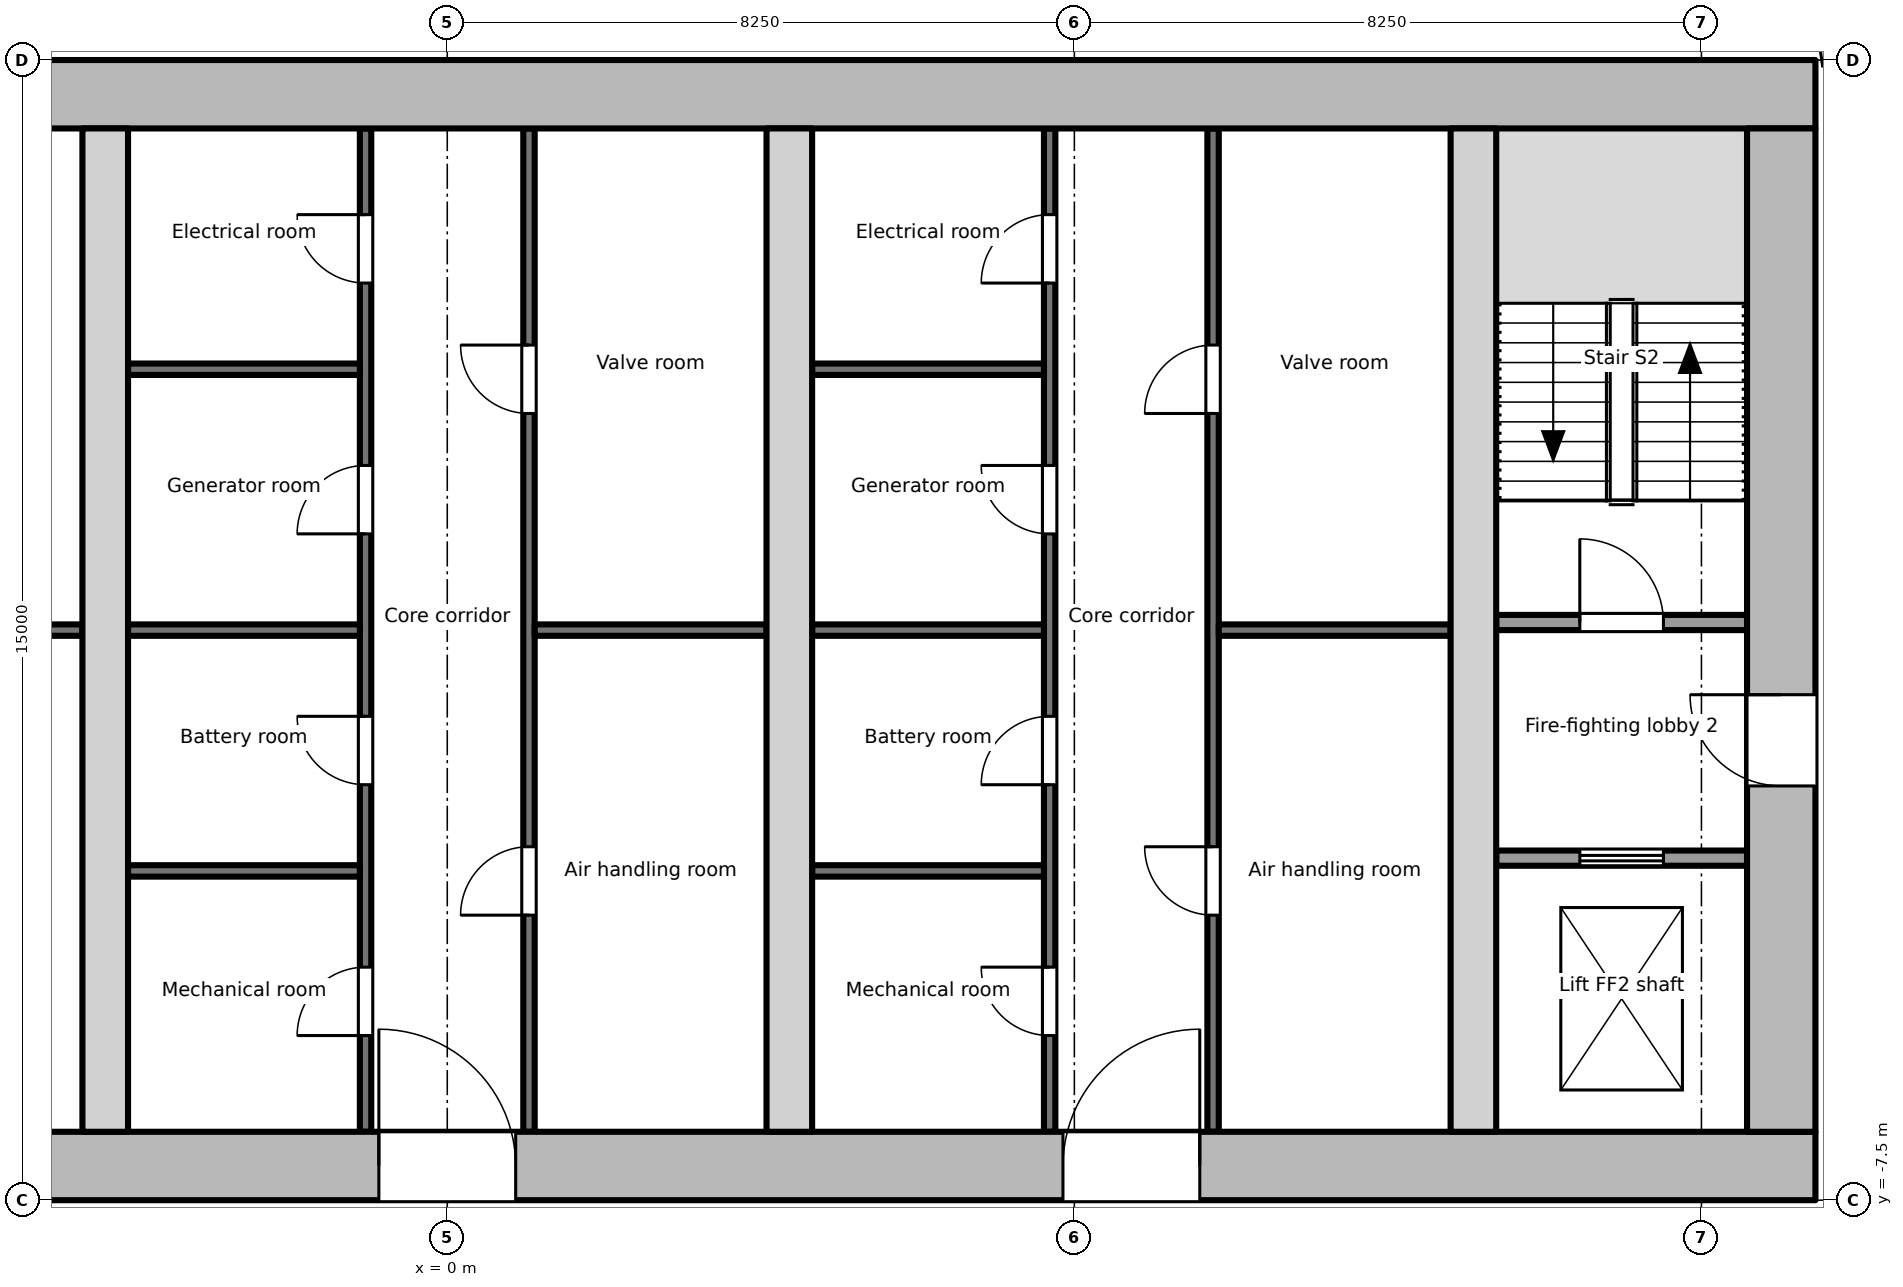
"""IFC4 building model, lengths in metres.
Left out: names, types, materials, properties, quantities, classifications, styles, units other than length and angle.
Written with IfcOpenShell. Run it as: python <this file> out.ifc"""

import sys

from ifc_helpers import new_model, si_unit, direction, frame, frame_2d, origin, place, context, subcontext, project, spatial, rectangle, extrude, element, fill, save


model = new_model("IFC4")
c1 = context("Model", 3, precision=1e-05, world=origin(), true_north=direction((0.0, 1.0)))
c2 = subcontext(c1, "Body", "Model", "MODEL_VIEW")
j1 = project(units=[si_unit("LENGTHUNIT", "METRE"), si_unit("PLANEANGLEUNIT", "RADIAN")], contexts=[c1])
p1 = place(None, origin())
s1 = spatial("IfcSite", under=j1, at=p1, CompositionType="ELEMENT")
p2 = place(p1, origin())
s2 = spatial("IfcBuilding", under=s1, at=p2, CompositionType="ELEMENT")
p3 = place(p2, frame((0.0, 0.0, 308.3)))
s3 = spatial("IfcBuildingStorey", under=s2, at=p3, CompositionType="ELEMENT", Elevation=308.3)
p4 = place(p3, frame((-18.0, -7.05, -0.2), z_axis=(0.0, 0.0, 1.0), x_axis=(1.0, 0.0, 0.0)))
e1 = element("IfcWall", 1, at=p4, inside=s3, PredefinedType="SHEAR", context=c2, shape_type="SweptSolid", body=[
    extrude(rectangle(XDim=36.0, YDim=0.9, at=frame_2d((18.0, 0.0))), origin(), (0.0, 0.0, 1.0), 4.0),
])
p5 = place(p4, frame((8.1, 0.0, 0.2)))
e2 = element("IfcOpeningElement", 2, at=p5, cuts=e1, PredefinedType="OPENING", context=c2, shape_type="SweptSolid", body=[
    extrude(rectangle(XDim=1.8, YDim=2.1, at=frame_2d((0.9, 1.05))), frame((0.0, 0.46, 0.0), z_axis=(0.0, -1.0, 0.0), x_axis=(1.0, 0.0, 0.0)), (0.0, 0.0, 1.0), 0.921),
])
p6 = place(p4, frame((17.1, 0.0, 0.2)))
e3 = element("IfcOpeningElement", 3, at=p6, cuts=e1, PredefinedType="OPENING", context=c2, shape_type="SweptSolid", body=[
    extrude(rectangle(XDim=1.8, YDim=2.1, at=frame_2d((0.9, 1.05))), frame((0.0, 0.46, 0.0), z_axis=(0.0, -1.0, 0.0), x_axis=(1.0, 0.0, 0.0)), (0.0, 0.0, 1.0), 0.921),
])
p7 = place(p4, frame((26.1, 0.0, 0.2)))
e4 = element("IfcOpeningElement", 4, at=p7, cuts=e1, PredefinedType="OPENING", context=c2, shape_type="SweptSolid", body=[
    extrude(rectangle(XDim=1.8, YDim=2.1, at=frame_2d((0.9, 1.05))), frame((0.0, 0.46, 0.0), z_axis=(0.0, -1.0, 0.0), x_axis=(1.0, 0.0, 0.0)), (0.0, 0.0, 1.0), 0.921),
])
p8 = place(p3, frame((-18.0, 7.05, -0.2), z_axis=(0.0, 0.0, 1.0), x_axis=(1.0, 0.0, 0.0)))
e5 = element("IfcWall", 5, at=p8, inside=s3, PredefinedType="SHEAR", context=c2, shape_type="SweptSolid", body=[
    extrude(rectangle(XDim=36.0, YDim=0.9, at=frame_2d((18.0, 0.0))), origin(), (0.0, 0.0, 1.0), 4.0),
])
p9 = place(p3, frame((17.55, -6.6, -0.2), z_axis=(0.0, 0.0, 1.0), x_axis=(0.0, 1.0, 0.0)))
e6 = element("IfcWall", 6, at=p9, inside=s3, PredefinedType="SHEAR", context=c2, shape_type="SweptSolid", body=[
    extrude(rectangle(XDim=13.2, YDim=0.9, at=frame_2d((6.6, 0.0))), origin(), (0.0, 0.0, 1.0), 4.0),
])
p10 = place(p9, frame((4.55, 0.0, 0.2)))
e7 = element("IfcOpeningElement", 7, at=p10, cuts=e6, PredefinedType="OPENING", context=c2, shape_type="SweptSolid", body=[
    extrude(rectangle(XDim=1.2, YDim=2.1, at=frame_2d((0.6, 1.05))), frame((0.0, 0.46, 0.0), z_axis=(0.0, -1.0, 0.0), x_axis=(1.0, 0.0, 0.0)), (0.0, 0.0, 1.0), 0.921),
])
for number, where, z_axis, x_axis in (
    (8, (-4.5, -6.6, -0.2), (0.0, 0.0, 1.0), (0.0, 1.0, 0.0)),
    (9, (4.5, -6.6, -0.2), (0.0, 0.0, 1.0), (0.0, 1.0, 0.0)),
    (10, (13.5, -6.6, -0.2), (0.0, 0.0, 1.0), (0.0, 1.0, 0.0)),
):
    element("IfcWall", number, at=place(p3, frame(where, z_axis=z_axis, x_axis=x_axis)), inside=s3, PredefinedType="SHEAR", context=c2, shape_type="SweptSolid", body=[
        extrude(rectangle(XDim=13.2, YDim=0.6, at=frame_2d((6.6, 0.0))), origin(), (0.0, 0.0, 1.0), 4.0),
    ])
p11 = place(p3, frame((13.8, -3.0, 0.0), z_axis=(0.0, 0.0, 1.0), x_axis=(1.0, 0.0, 0.0)))
e11 = element("IfcWall", 11, at=p11, inside=s3, PredefinedType="PARTITIONING", context=c2, shape_type="SweptSolid", body=[
    extrude(rectangle(XDim=3.3, YDim=0.2, at=frame_2d((1.65, 0.0))), origin(), (0.0, 0.0, 1.0), 3.8),
])
p12 = place(p11, frame((1.1, 0.0, 0.0)))
e12 = element("IfcOpeningElement", 12, at=p12, cuts=e11, PredefinedType="OPENING", context=c2, shape_type="SweptSolid", body=[
    extrude(rectangle(XDim=1.1, YDim=2.1, at=frame_2d((0.55, 1.05))), frame((0.0, 0.111, 0.0), z_axis=(0.0, -1.0, 0.0), x_axis=(1.0, 0.0, 0.0)), (0.0, 0.0, 1.0), 0.221),
])
p13 = place(p3, frame((13.8, 0.1, 0.0), z_axis=(0.0, 0.0, 1.0), x_axis=(1.0, 0.0, 0.0)))
e13 = element("IfcWall", 13, at=p13, inside=s3, PredefinedType="PARTITIONING", context=c2, shape_type="SweptSolid", body=[
    extrude(rectangle(XDim=3.3, YDim=0.2, at=frame_2d((1.65, 0.0))), origin(), (0.0, 0.0, 1.0), 3.8),
])
p14 = place(p13, frame((1.1, 0.0, 0.0)))
e14 = element("IfcOpeningElement", 14, at=p14, cuts=e13, PredefinedType="OPENING", context=c2, shape_type="SweptSolid", body=[
    extrude(rectangle(XDim=1.1, YDim=2.1, at=frame_2d((0.55, 1.05))), frame((0.0, 0.111, 0.0), z_axis=(0.0, -1.0, 0.0), x_axis=(1.0, 0.0, 0.0)), (0.0, 0.0, 1.0), 0.221),
])
p15 = place(p3, frame((-7.85, 0.0, 0.0), z_axis=(0.0, 0.0, 1.0), x_axis=(1.0, 0.0, 0.0)))
e15 = element("IfcWall", 15, at=p15, inside=s3, PredefinedType="PARTITIONING", context=c2, shape_type="SweptSolid", body=[
    extrude(rectangle(XDim=3.05, YDim=0.15, at=frame_2d((1.525, 0.0))), origin(), (0.0, 0.0, 1.0), 3.8),
])
p16 = place(p3, frame((-1.075, -6.6, 0.0), z_axis=(0.0, 0.0, 1.0), x_axis=(0.0, 1.0, 0.0)))
e16 = element("IfcWall", 16, at=p16, inside=s3, PredefinedType="PARTITIONING", context=c2, shape_type="SweptSolid", body=[
    extrude(rectangle(XDim=13.2, YDim=0.15, at=frame_2d((6.6, 0.0))), origin(), (0.0, 0.0, 1.0), 3.8),
])
p17 = place(p16, frame((1.266, 0.0, 0.0)))
e17 = element("IfcOpeningElement", 17, at=p17, cuts=e16, PredefinedType="OPENING", context=c2, shape_type="SweptSolid", body=[
    extrude(rectangle(XDim=0.9, YDim=2.1, at=frame_2d((0.45, 1.05))), frame((0.0, 0.085, 0.0), z_axis=(0.0, -1.0, 0.0), x_axis=(1.0, 0.0, 0.0)), (0.0, 0.0, 1.0), 0.171),
])
p18 = place(p16, frame((4.566, 0.0, 0.0)))
e18 = element("IfcOpeningElement", 18, at=p18, cuts=e16, PredefinedType="OPENING", context=c2, shape_type="SweptSolid", body=[
    extrude(rectangle(XDim=0.9, YDim=2.1, at=frame_2d((0.45, 1.05))), frame((0.0, 0.085, 0.0), z_axis=(0.0, -1.0, 0.0), x_axis=(1.0, 0.0, 0.0)), (0.0, 0.0, 1.0), 0.171),
])
p19 = place(p16, frame((7.866, 0.0, 0.0)))
e19 = element("IfcOpeningElement", 19, at=p19, cuts=e16, PredefinedType="OPENING", context=c2, shape_type="SweptSolid", body=[
    extrude(rectangle(XDim=0.9, YDim=2.1, at=frame_2d((0.45, 1.05))), frame((0.0, 0.085, 0.0), z_axis=(0.0, -1.0, 0.0), x_axis=(1.0, 0.0, 0.0)), (0.0, 0.0, 1.0), 0.171),
])
p20 = place(p16, frame((11.166, 0.0, 0.0)))
e20 = element("IfcOpeningElement", 20, at=p20, cuts=e16, PredefinedType="OPENING", context=c2, shape_type="SweptSolid", body=[
    extrude(rectangle(XDim=0.9, YDim=2.1, at=frame_2d((0.45, 1.05))), frame((0.0, 0.085, 0.0), z_axis=(0.0, -1.0, 0.0), x_axis=(1.0, 0.0, 0.0)), (0.0, 0.0, 1.0), 0.171),
])
for number, where, z_axis, x_axis in (
    (21, (-4.2, -3.168, 0.0), (0.0, 0.0, 1.0), (1.0, 0.0, 0.0)),
    (22, (-4.2, 0.0, 0.0), (0.0, 0.0, 1.0), (1.0, 0.0, 0.0)),
    (23, (-4.2, 3.432, 0.0), (0.0, 0.0, 1.0), (1.0, 0.0, 0.0)),
):
    element("IfcWall", number, at=place(p3, frame(where, z_axis=z_axis, x_axis=x_axis)), inside=s3, PredefinedType="PARTITIONING", context=c2, shape_type="SweptSolid", body=[
        extrude(rectangle(XDim=3.05, YDim=0.15, at=frame_2d((1.525, 0.0))), origin(), (0.0, 0.0, 1.0), 3.8),
    ])
p21 = place(p3, frame((1.075, -6.6, 0.0), z_axis=(0.0, 0.0, 1.0), x_axis=(0.0, 1.0, 0.0)))
e24 = element("IfcWall", 24, at=p21, inside=s3, PredefinedType="PARTITIONING", context=c2, shape_type="SweptSolid", body=[
    extrude(rectangle(XDim=13.2, YDim=0.15, at=frame_2d((6.6, 0.0))), origin(), (0.0, 0.0, 1.0), 3.8),
])
p22 = place(p21, frame((2.85, 0.0, 0.0)))
e25 = element("IfcOpeningElement", 25, at=p22, cuts=e24, PredefinedType="OPENING", context=c2, shape_type="SweptSolid", body=[
    extrude(rectangle(XDim=0.9, YDim=2.1, at=frame_2d((0.45, 1.05))), frame((0.0, 0.085, 0.0), z_axis=(0.0, -1.0, 0.0), x_axis=(1.0, 0.0, 0.0)), (0.0, 0.0, 1.0), 0.171),
])
p23 = place(p21, frame((9.45, 0.0, 0.0)))
e26 = element("IfcOpeningElement", 26, at=p23, cuts=e24, PredefinedType="OPENING", context=c2, shape_type="SweptSolid", body=[
    extrude(rectangle(XDim=0.9, YDim=2.1, at=frame_2d((0.45, 1.05))), frame((0.0, 0.085, 0.0), z_axis=(0.0, -1.0, 0.0), x_axis=(1.0, 0.0, 0.0)), (0.0, 0.0, 1.0), 0.171),
])
p24 = place(p3, frame((1.15, 0.0, 0.0), z_axis=(0.0, 0.0, 1.0), x_axis=(1.0, 0.0, 0.0)))
e27 = element("IfcWall", 27, at=p24, inside=s3, PredefinedType="PARTITIONING", context=c2, shape_type="SweptSolid", body=[
    extrude(rectangle(XDim=3.05, YDim=0.15, at=frame_2d((1.525, 0.0))), origin(), (0.0, 0.0, 1.0), 3.8),
])
p25 = place(p3, frame((7.925, -6.6, 0.0), z_axis=(0.0, 0.0, 1.0), x_axis=(0.0, 1.0, 0.0)))
e28 = element("IfcWall", 28, at=p25, inside=s3, PredefinedType="PARTITIONING", context=c2, shape_type="SweptSolid", body=[
    extrude(rectangle(XDim=13.2, YDim=0.15, at=frame_2d((6.6, 0.0))), origin(), (0.0, 0.0, 1.0), 3.8),
])
p26 = place(p25, frame((1.266, 0.0, 0.0)))
e29 = element("IfcOpeningElement", 29, at=p26, cuts=e28, PredefinedType="OPENING", context=c2, shape_type="SweptSolid", body=[
    extrude(rectangle(XDim=0.9, YDim=2.1, at=frame_2d((0.45, 1.05))), frame((0.0, 0.085, 0.0), z_axis=(0.0, -1.0, 0.0), x_axis=(1.0, 0.0, 0.0)), (0.0, 0.0, 1.0), 0.171),
])
p27 = place(p25, frame((4.566, 0.0, 0.0)))
e30 = element("IfcOpeningElement", 30, at=p27, cuts=e28, PredefinedType="OPENING", context=c2, shape_type="SweptSolid", body=[
    extrude(rectangle(XDim=0.9, YDim=2.1, at=frame_2d((0.45, 1.05))), frame((0.0, 0.085, 0.0), z_axis=(0.0, -1.0, 0.0), x_axis=(1.0, 0.0, 0.0)), (0.0, 0.0, 1.0), 0.171),
])
p28 = place(p25, frame((7.866, 0.0, 0.0)))
e31 = element("IfcOpeningElement", 31, at=p28, cuts=e28, PredefinedType="OPENING", context=c2, shape_type="SweptSolid", body=[
    extrude(rectangle(XDim=0.9, YDim=2.1, at=frame_2d((0.45, 1.05))), frame((0.0, 0.085, 0.0), z_axis=(0.0, -1.0, 0.0), x_axis=(1.0, 0.0, 0.0)), (0.0, 0.0, 1.0), 0.171),
])
p29 = place(p25, frame((11.166, 0.0, 0.0)))
e32 = element("IfcOpeningElement", 32, at=p29, cuts=e28, PredefinedType="OPENING", context=c2, shape_type="SweptSolid", body=[
    extrude(rectangle(XDim=0.9, YDim=2.1, at=frame_2d((0.45, 1.05))), frame((0.0, 0.085, 0.0), z_axis=(0.0, -1.0, 0.0), x_axis=(1.0, 0.0, 0.0)), (0.0, 0.0, 1.0), 0.171),
])
for number, where, z_axis, x_axis in (
    (33, (4.8, -3.168, 0.0), (0.0, 0.0, 1.0), (1.0, 0.0, 0.0)),
    (34, (4.8, 0.0, 0.0), (0.0, 0.0, 1.0), (1.0, 0.0, 0.0)),
    (35, (4.8, 3.432, 0.0), (0.0, 0.0, 1.0), (1.0, 0.0, 0.0)),
):
    element("IfcWall", number, at=place(p3, frame(where, z_axis=z_axis, x_axis=x_axis)), inside=s3, PredefinedType="PARTITIONING", context=c2, shape_type="SweptSolid", body=[
        extrude(rectangle(XDim=3.05, YDim=0.15, at=frame_2d((1.525, 0.0))), origin(), (0.0, 0.0, 1.0), 3.8),
    ])
p30 = place(p3, frame((10.075, -6.6, 0.0), z_axis=(0.0, 0.0, 1.0), x_axis=(0.0, 1.0, 0.0)))
e36 = element("IfcWall", 36, at=p30, inside=s3, PredefinedType="PARTITIONING", context=c2, shape_type="SweptSolid", body=[
    extrude(rectangle(XDim=13.2, YDim=0.15, at=frame_2d((6.6, 0.0))), origin(), (0.0, 0.0, 1.0), 3.8),
])
p31 = place(p30, frame((2.85, 0.0, 0.0)))
e37 = element("IfcOpeningElement", 37, at=p31, cuts=e36, PredefinedType="OPENING", context=c2, shape_type="SweptSolid", body=[
    extrude(rectangle(XDim=0.9, YDim=2.1, at=frame_2d((0.45, 1.05))), frame((0.0, 0.085, 0.0), z_axis=(0.0, -1.0, 0.0), x_axis=(1.0, 0.0, 0.0)), (0.0, 0.0, 1.0), 0.171),
])
p32 = place(p30, frame((9.45, 0.0, 0.0)))
e38 = element("IfcOpeningElement", 38, at=p32, cuts=e36, PredefinedType="OPENING", context=c2, shape_type="SweptSolid", body=[
    extrude(rectangle(XDim=0.9, YDim=2.1, at=frame_2d((0.45, 1.05))), frame((0.0, 0.085, 0.0), z_axis=(0.0, -1.0, 0.0), x_axis=(1.0, 0.0, 0.0)), (0.0, 0.0, 1.0), 0.171),
])
p33 = place(p3, frame((10.15, 0.0, 0.0), z_axis=(0.0, 0.0, 1.0), x_axis=(1.0, 0.0, 0.0)))
e39 = element("IfcWall", 39, at=p33, inside=s3, PredefinedType="PARTITIONING", context=c2, shape_type="SweptSolid", body=[
    extrude(rectangle(XDim=3.05, YDim=0.15, at=frame_2d((1.525, 0.0))), origin(), (0.0, 0.0, 1.0), 3.8),
])
p34 = place(p12, origin())
e40 = element("IfcDoor", 40, at=p34, inside=s3, OperationType="DOUBLE_DOOR_SLIDING", PredefinedType="DOOR", context=c2, shape_type="SweptSolid", body=[
    extrude(rectangle(XDim=1.1, YDim=2.1, at=frame_2d((0.55, 1.05))), frame((0.0, 0.025, 0.0), z_axis=(0.0, -1.0, 0.0), x_axis=(1.0, 0.0, 0.0)), (0.0, 0.0, 1.0), 0.05),
])
fill(e12, e40)
p35 = place(p10, origin())
e41 = element("IfcDoor", 41, at=p35, inside=s3, OperationType="SINGLE_SWING_RIGHT", PredefinedType="DOOR", context=c2, shape_type="SweptSolid", body=[
    extrude(rectangle(XDim=1.2, YDim=2.1, at=frame_2d((0.6, 1.05))), frame((0.0, 0.025, 0.0), z_axis=(0.0, -1.0, 0.0), x_axis=(1.0, 0.0, 0.0)), (0.0, 0.0, 1.0), 0.05),
])
fill(e7, e41)
p36 = place(p14, origin())
e42 = element("IfcDoor", 42, at=p36, inside=s3, OperationType="SINGLE_SWING_LEFT", PredefinedType="DOOR", context=c2, shape_type="SweptSolid", body=[
    extrude(rectangle(XDim=1.1, YDim=2.1, at=frame_2d((0.55, 1.05))), frame((0.0, 0.025, 0.0), z_axis=(0.0, -1.0, 0.0), x_axis=(1.0, 0.0, 0.0)), (0.0, 0.0, 1.0), 0.05),
])
fill(e14, e42)
p37 = place(p17, origin())
e43 = element("IfcDoor", 43, at=p37, inside=s3, OperationType="SINGLE_SWING_LEFT", PredefinedType="DOOR", context=c2, shape_type="SweptSolid", body=[
    extrude(rectangle(XDim=0.9, YDim=2.1, at=frame_2d((0.45, 1.05))), frame((0.0, 0.025, 0.0), z_axis=(0.0, -1.0, 0.0), x_axis=(1.0, 0.0, 0.0)), (0.0, 0.0, 1.0), 0.05),
])
fill(e17, e43)
p38 = place(p18, origin())
e44 = element("IfcDoor", 44, at=p38, inside=s3, OperationType="SINGLE_SWING_RIGHT", PredefinedType="DOOR", context=c2, shape_type="SweptSolid", body=[
    extrude(rectangle(XDim=0.9, YDim=2.1, at=frame_2d((0.45, 1.05))), frame((0.0, 0.025, 0.0), z_axis=(0.0, -1.0, 0.0), x_axis=(1.0, 0.0, 0.0)), (0.0, 0.0, 1.0), 0.05),
])
fill(e18, e44)
p39 = place(p19, origin())
e45 = element("IfcDoor", 45, at=p39, inside=s3, OperationType="SINGLE_SWING_LEFT", PredefinedType="DOOR", context=c2, shape_type="SweptSolid", body=[
    extrude(rectangle(XDim=0.9, YDim=2.1, at=frame_2d((0.45, 1.05))), frame((0.0, 0.025, 0.0), z_axis=(0.0, -1.0, 0.0), x_axis=(1.0, 0.0, 0.0)), (0.0, 0.0, 1.0), 0.05),
])
fill(e19, e45)
p40 = place(p20, origin())
e46 = element("IfcDoor", 46, at=p40, inside=s3, OperationType="SINGLE_SWING_RIGHT", PredefinedType="DOOR", context=c2, shape_type="SweptSolid", body=[
    extrude(rectangle(XDim=0.9, YDim=2.1, at=frame_2d((0.45, 1.05))), frame((0.0, 0.025, 0.0), z_axis=(0.0, -1.0, 0.0), x_axis=(1.0, 0.0, 0.0)), (0.0, 0.0, 1.0), 0.05),
])
fill(e20, e46)
p41 = place(p22, origin())
e47 = element("IfcDoor", 47, at=p41, inside=s3, OperationType="SINGLE_SWING_LEFT", PredefinedType="DOOR", context=c2, shape_type="SweptSolid", body=[
    extrude(rectangle(XDim=0.9, YDim=2.1, at=frame_2d((0.45, 1.05))), frame((0.0, 0.025, 0.0), z_axis=(0.0, -1.0, 0.0), x_axis=(1.0, 0.0, 0.0)), (0.0, 0.0, 1.0), 0.05),
])
fill(e25, e47)
p42 = place(p23, origin())
e48 = element("IfcDoor", 48, at=p42, inside=s3, OperationType="SINGLE_SWING_RIGHT", PredefinedType="DOOR", context=c2, shape_type="SweptSolid", body=[
    extrude(rectangle(XDim=0.9, YDim=2.1, at=frame_2d((0.45, 1.05))), frame((0.0, 0.025, 0.0), z_axis=(0.0, -1.0, 0.0), x_axis=(1.0, 0.0, 0.0)), (0.0, 0.0, 1.0), 0.05),
])
fill(e26, e48)
p43 = place(p6, origin())
e49 = element("IfcDoor", 49, at=p43, inside=s3, OperationType="SINGLE_SWING_LEFT", PredefinedType="DOOR", context=c2, shape_type="SweptSolid", body=[
    extrude(rectangle(XDim=1.8, YDim=2.1, at=frame_2d((0.9, 1.05))), frame((0.0, 0.025, 0.0), z_axis=(0.0, -1.0, 0.0), x_axis=(1.0, 0.0, 0.0)), (0.0, 0.0, 1.0), 0.05),
])
fill(e3, e49)
p44 = place(p26, origin())
e50 = element("IfcDoor", 50, at=p44, inside=s3, OperationType="SINGLE_SWING_RIGHT", PredefinedType="DOOR", context=c2, shape_type="SweptSolid", body=[
    extrude(rectangle(XDim=0.9, YDim=2.1, at=frame_2d((0.45, 1.05))), frame((0.0, 0.025, 0.0), z_axis=(0.0, -1.0, 0.0), x_axis=(1.0, 0.0, 0.0)), (0.0, 0.0, 1.0), 0.05),
])
fill(e29, e50)
p45 = place(p27, origin())
e51 = element("IfcDoor", 51, at=p45, inside=s3, OperationType="SINGLE_SWING_LEFT", PredefinedType="DOOR", context=c2, shape_type="SweptSolid", body=[
    extrude(rectangle(XDim=0.9, YDim=2.1, at=frame_2d((0.45, 1.05))), frame((0.0, 0.025, 0.0), z_axis=(0.0, -1.0, 0.0), x_axis=(1.0, 0.0, 0.0)), (0.0, 0.0, 1.0), 0.05),
])
fill(e30, e51)
p46 = place(p28, origin())
e52 = element("IfcDoor", 52, at=p46, inside=s3, OperationType="SINGLE_SWING_RIGHT", PredefinedType="DOOR", context=c2, shape_type="SweptSolid", body=[
    extrude(rectangle(XDim=0.9, YDim=2.1, at=frame_2d((0.45, 1.05))), frame((0.0, 0.025, 0.0), z_axis=(0.0, -1.0, 0.0), x_axis=(1.0, 0.0, 0.0)), (0.0, 0.0, 1.0), 0.05),
])
fill(e31, e52)
p47 = place(p29, origin())
e53 = element("IfcDoor", 53, at=p47, inside=s3, OperationType="SINGLE_SWING_LEFT", PredefinedType="DOOR", context=c2, shape_type="SweptSolid", body=[
    extrude(rectangle(XDim=0.9, YDim=2.1, at=frame_2d((0.45, 1.05))), frame((0.0, 0.025, 0.0), z_axis=(0.0, -1.0, 0.0), x_axis=(1.0, 0.0, 0.0)), (0.0, 0.0, 1.0), 0.05),
])
fill(e32, e53)
p48 = place(p31, origin())
e54 = element("IfcDoor", 54, at=p48, inside=s3, OperationType="SINGLE_SWING_RIGHT", PredefinedType="DOOR", context=c2, shape_type="SweptSolid", body=[
    extrude(rectangle(XDim=0.9, YDim=2.1, at=frame_2d((0.45, 1.05))), frame((0.0, 0.025, 0.0), z_axis=(0.0, -1.0, 0.0), x_axis=(1.0, 0.0, 0.0)), (0.0, 0.0, 1.0), 0.05),
])
fill(e37, e54)
p49 = place(p32, origin())
e55 = element("IfcDoor", 55, at=p49, inside=s3, OperationType="SINGLE_SWING_LEFT", PredefinedType="DOOR", context=c2, shape_type="SweptSolid", body=[
    extrude(rectangle(XDim=0.9, YDim=2.1, at=frame_2d((0.45, 1.05))), frame((0.0, 0.025, 0.0), z_axis=(0.0, -1.0, 0.0), x_axis=(1.0, 0.0, 0.0)), (0.0, 0.0, 1.0), 0.05),
])
fill(e38, e55)
p50 = place(p7, origin())
e56 = element("IfcDoor", 56, at=p50, inside=s3, OperationType="SINGLE_SWING_RIGHT", PredefinedType="DOOR", context=c2, shape_type="SweptSolid", body=[
    extrude(rectangle(XDim=1.8, YDim=2.1, at=frame_2d((0.9, 1.05))), frame((0.0, 0.025, 0.0), z_axis=(0.0, -1.0, 0.0), x_axis=(1.0, 0.0, 0.0)), (0.0, 0.0, 1.0), 0.05),
])
fill(e4, e56)
save(model, sys.argv[1])
